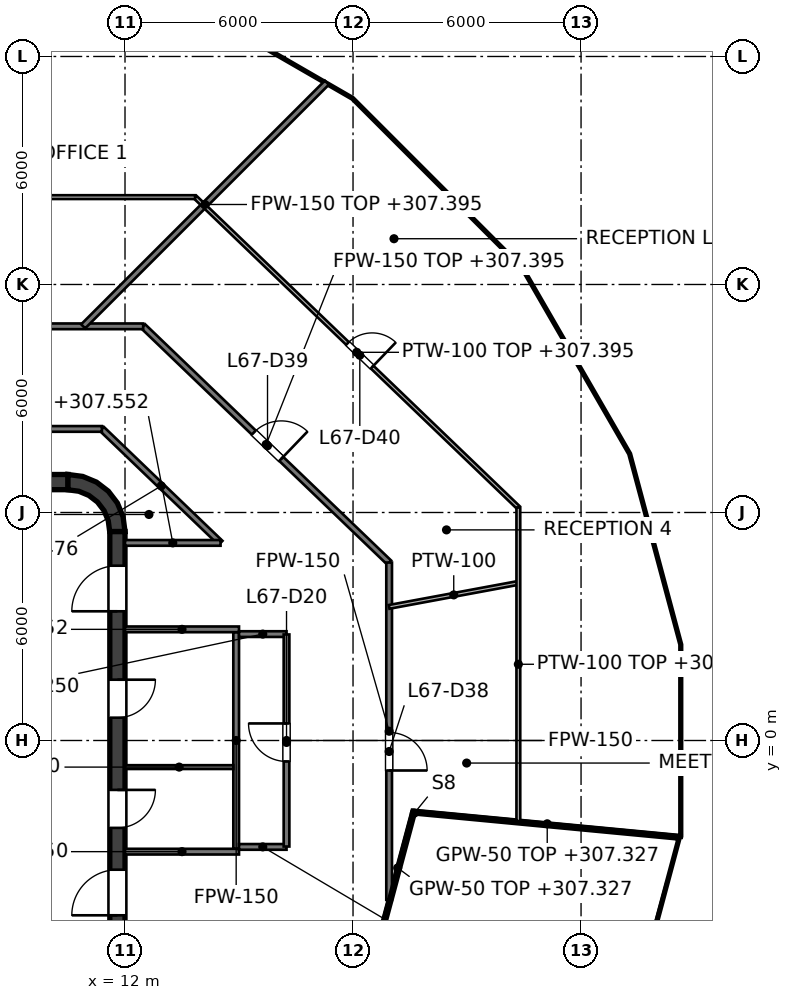
"""IFC4 building model, lengths in metres.
Left out: names, types, materials, properties, quantities, classifications, styles, units other than length and angle.
Written with IfcOpenShell. Run it as: python <this file> out.ifc"""

import sys

from ifc_helpers import new_model, si_unit, direction, frame, frame_2d, origin, place, context, subcontext, project, spatial, polyline, rectangle, outline, extrude, element, fill, save


model = new_model("IFC4")
c1 = context("Model", 3, precision=1e-05, world=origin(), true_north=direction((0.0, 1.0)))
c2 = subcontext(c1, "Body", "Model", "MODEL_VIEW")
j1 = project(units=[si_unit("LENGTHUNIT", "METRE"), si_unit("PLANEANGLEUNIT", "RADIAN")], contexts=[c1])
p1 = place(None, origin())
s1 = spatial("IfcSite", under=j1, at=p1, CompositionType="ELEMENT")
p2 = place(p1, origin())
s2 = spatial("IfcBuilding", under=s1, at=p2, CompositionType="ELEMENT")
p3 = place(p2, frame((0.0, 0.0, 304.4)))
s3 = spatial("IfcBuildingStorey", under=s2, at=p3, CompositionType="ELEMENT", Elevation=304.4)
p4 = place(p3, frame((-10.5, 6.8, 0.0), z_axis=(0.0, 0.0, 1.0), x_axis=(1.0, 0.0, 0.0)))
e1 = element("IfcWall", 1, at=p4, inside=s3, PredefinedType="SHEAR", context=c2, shape_type="SweptSolid", body=[
    extrude(rectangle(XDim=21.0, YDim=0.4, at=frame_2d((10.5, 0.0))), origin(), (0.0, 0.0, 1.0), 4.0),
])
p5 = place(p3, frame((11.8, -5.5, 0.0), z_axis=(0.0, 0.0, 1.0), x_axis=(0.0, 1.0, 0.0)))
e2 = element("IfcWall", 2, at=p5, inside=s3, PredefinedType="SHEAR", context=c2, shape_type="SweptSolid", body=[
    extrude(rectangle(XDim=11.0, YDim=0.4, at=frame_2d((5.5, 0.0))), origin(), (0.0, 0.0, 1.0), 4.0),
])
p6 = place(p5, frame((3.2, 0.0, 0.0)))
e3 = element("IfcOpeningElement", 3, at=p6, cuts=e2, PredefinedType="OPENING", context=c2, shape_type="SweptSolid", body=[
    extrude(rectangle(XDim=1.0, YDim=2.1, at=frame_2d((0.5, 1.05))), frame((0.0, 0.2, 0.0), z_axis=(0.0, -1.0, 0.0), x_axis=(1.0, 0.0, 0.0)), (0.0, 0.0, 1.0), 0.4),
])
p7 = place(p5, frame((6.1, 0.0, 0.0)))
e4 = element("IfcOpeningElement", 4, at=p7, cuts=e2, PredefinedType="OPENING", context=c2, shape_type="SweptSolid", body=[
    extrude(rectangle(XDim=1.0, YDim=2.1, at=frame_2d((0.5, 1.05))), frame((0.0, 0.2, 0.0), z_axis=(0.0, -1.0, 0.0), x_axis=(1.0, 0.0, 0.0)), (0.0, 0.0, 1.0), 0.4),
])
p8 = place(p5, frame((0.9, 0.0, 0.0)))
e5 = element("IfcOpeningElement", 5, at=p8, cuts=e2, PredefinedType="OPENING", context=c2, shape_type="SweptSolid", body=[
    extrude(rectangle(XDim=1.2, YDim=2.1, at=frame_2d((0.6, 1.05))), frame((0.0, 0.2, 0.0), z_axis=(0.0, -1.0, 0.0), x_axis=(1.0, 0.0, 0.0)), (0.0, 0.0, 1.0), 0.4),
])
p9 = place(p5, frame((8.9, 0.0, 0.0)))
e6 = element("IfcOpeningElement", 6, at=p9, cuts=e2, PredefinedType="OPENING", context=c2, shape_type="SweptSolid", body=[
    extrude(rectangle(XDim=1.2, YDim=2.1, at=frame_2d((0.6, 1.05))), frame((0.0, 0.2, 0.0), z_axis=(0.0, -1.0, 0.0), x_axis=(1.0, 0.0, 0.0)), (0.0, 0.0, 1.0), 0.4),
])
p10 = place(p3, origin())
e7 = element("IfcWall", 7, at=p10, inside=s3, PredefinedType="SHEAR", context=c2, shape_type="SweptSolid", body=[
    extrude(outline(polyline([(10.5, 7.0), (10.5, 6.596), (10.784, 6.559), (11.048, 6.45), (11.275, 6.275), (11.45, 6.048), (11.559, 5.784), (11.596, 5.5), (12.0, 5.5), (11.949, 5.888), (11.799, 6.25), (11.561, 6.561), (11.25, 6.799), (10.888, 6.949), (10.5, 7.0)])), origin(), (0.0, 0.0, 1.0), 4.0),
])
p11 = place(p3, frame((14.925, -2.85, 0.0), z_axis=(0.0, 0.0, 1.0), x_axis=(0.0, 1.0, 0.0)))
e8 = element("IfcWall", 8, at=p11, inside=s3, PredefinedType="PARTITIONING", context=c2, shape_type="SweptSolid", body=[
    extrude(rectangle(XDim=5.7, YDim=0.15, at=frame_2d((2.85, 0.0))), origin(), (0.0, 0.0, 1.0), 2.927),
])
p12 = place(p3, frame((12.0, 2.925, 0.0), z_axis=(0.0, 0.0, 1.0), x_axis=(1.0, 0.0, 0.0)))
e9 = element("IfcWall", 9, at=p12, inside=s3, PredefinedType="PARTITIONING", context=c2, shape_type="SweptSolid", body=[
    extrude(rectangle(XDim=3.0, YDim=0.15, at=frame_2d((1.5, 0.0))), origin(), (0.0, 0.0, 1.0), 3.152),
])
p13 = place(p3, frame((12.0, -2.925, 0.0), z_axis=(0.0, 0.0, 1.0), x_axis=(1.0, 0.0, 0.0)))
e10 = element("IfcWall", 10, at=p13, inside=s3, PredefinedType="PARTITIONING", context=c2, shape_type="SweptSolid", body=[
    extrude(rectangle(XDim=3.0, YDim=0.15, at=frame_2d((1.5, 0.0))), origin(), (0.0, 0.0, 1.0), 3.85),
])
p14 = place(p3, frame((12.0, -0.7, 0.0), z_axis=(0.0, 0.0, 1.0), x_axis=(1.0, 0.0, 0.0)))
e11 = element("IfcWall", 11, at=p14, inside=s3, PredefinedType="PARTITIONING", context=c2, shape_type="SweptSolid", body=[
    extrude(rectangle(XDim=2.85, YDim=0.1, at=frame_2d((1.425, 0.0))), origin(), (0.0, 0.0, 1.0), 3.85),
])
p15 = place(p3, frame((11.391, 8.199, 0.0), z_axis=(0.0, 0.0, 1.0), x_axis=(0.721256597366, -0.692667972954, 0.0)))
e12 = element("IfcWall", 12, at=p15, inside=s3, PredefinedType="PARTITIONING", context=c2, shape_type="SweptSolid", body=[
    extrude(rectangle(XDim=4.33, YDim=0.15, at=frame_2d((2.165, 0.0))), origin(), (0.0, 0.0, 1.0), 3.076),
])
p16 = place(p3, frame((12.478, 10.899, 0.0), z_axis=(0.0, 0.0, 1.0), x_axis=(0.72127259513, -0.692651314526, 0.0)))
e13 = element("IfcWall", 13, at=p16, inside=s3, PredefinedType="PARTITIONING", context=c2, shape_type="SweptSolid", body=[
    extrude(rectangle(XDim=8.974, YDim=0.15, at=frame_2d((4.487, 0.0))), origin(), (0.0, 0.0, 1.0), 2.995),
])
p17 = place(p16, frame((4.036, 0.0, 0.0)))
e14 = element("IfcOpeningElement", 14, at=p17, cuts=e13, PredefinedType="OPENING", context=c2, shape_type="SweptSolid", body=[
    extrude(rectangle(XDim=1.0, YDim=2.1, at=frame_2d((0.5, 1.05))), frame((0.0, 0.075, 0.0), z_axis=(0.0, -1.0, 0.0), x_axis=(1.0, 0.0, 0.0)), (0.0, 0.0, 1.0), 0.15),
])
for number, where, z_axis, x_axis in (
    (15, (15.0, -2.8, 0.0), (0.0, 0.0, 1.0), (1.0, 0.0, 0.0)),
    (16, (15.0, 2.8, 0.0), (0.0, 0.0, 1.0), (1.0, 0.0, 0.0)),
):
    element("IfcWall", number, at=place(p3, frame(where, z_axis=z_axis, x_axis=x_axis)), inside=s3, PredefinedType="PARTITIONING", context=c2, shape_type="SweptSolid", body=[
        extrude(rectangle(XDim=1.25, YDim=0.15, at=frame_2d((0.625, 0.0))), origin(), (0.0, 0.0, 1.0), 3.85),
    ])
p18 = place(p3, frame((12.0, 5.2, 0.0), z_axis=(0.0, 0.0, 1.0), x_axis=(1.0, 0.0, 0.0)))
e17 = element("IfcWall", 17, at=p18, inside=s3, PredefinedType="PARTITIONING", context=c2, shape_type="SweptSolid", body=[
    extrude(rectangle(XDim=2.514, YDim=0.15, at=frame_2d((1.257, 0.0))), origin(), (0.0, 0.0, 1.0), 3.152),
])
p19 = place(p3, frame((-11.391, 8.199, 0.0), z_axis=(0.0, 0.0, 1.0), x_axis=(1.0, 0.0, 0.0)))
e18 = element("IfcWall", 18, at=p19, inside=s3, PredefinedType="PARTITIONING", context=c2, shape_type="SweptSolid", body=[
    extrude(rectangle(XDim=22.782, YDim=0.15, at=frame_2d((11.391, 0.0))), origin(), (0.0, 0.0, 1.0), 2.927),
])
p20 = place(p19, frame((16.536, 0.0, 0.0)))
e19 = element("IfcOpeningElement", 19, at=p20, cuts=e18, PredefinedType="OPENING", context=c2, shape_type="SweptSolid", body=[
    extrude(rectangle(XDim=1.0, YDim=2.1, at=frame_2d((0.5, 1.05))), frame((0.0, 0.075, 0.0), z_axis=(0.0, -1.0, 0.0), x_axis=(1.0, 0.0, 0.0)), (0.0, 0.0, 1.0), 0.15),
])
p21 = place(p19, frame((5.145, 0.0, 0.0)))
e20 = element("IfcOpeningElement", 20, at=p21, cuts=e18, PredefinedType="OPENING", context=c2, shape_type="SweptSolid", body=[
    extrude(rectangle(XDim=1.0, YDim=2.1, at=frame_2d((0.5, 1.05))), frame((0.0, 0.075, 0.0), z_axis=(0.0, -1.0, 0.0), x_axis=(1.0, 0.0, 0.0)), (0.0, 0.0, 1.0), 0.15),
])
p22 = place(p3, frame((-12.478, 10.899, 0.0), z_axis=(0.0, 0.0, 1.0), x_axis=(1.0, 0.0, 0.0)))
e21 = element("IfcWall", 21, at=p22, inside=s3, PredefinedType="PARTITIONING", context=c2, shape_type="SweptSolid", body=[
    extrude(rectangle(XDim=24.956, YDim=0.15, at=frame_2d((12.478, 0.0))), origin(), (0.0, 0.0, 1.0), 2.927),
])
p23 = place(p22, frame((19.856, 0.0, 0.0)))
e22 = element("IfcOpeningElement", 22, at=p23, cuts=e21, PredefinedType="OPENING", context=c2, shape_type="SweptSolid", body=[
    extrude(rectangle(XDim=1.0, YDim=2.1, at=frame_2d((0.5, 1.05))), frame((0.0, 0.075, 0.0), z_axis=(0.0, -1.0, 0.0), x_axis=(1.0, 0.0, 0.0)), (0.0, 0.0, 1.0), 0.15),
])
p24 = place(p22, frame((14.508, 0.0, 0.0)))
e23 = element("IfcOpeningElement", 23, at=p24, cuts=e21, PredefinedType="OPENING", context=c2, shape_type="SweptSolid", body=[
    extrude(rectangle(XDim=1.0, YDim=2.1, at=frame_2d((0.5, 1.05))), frame((0.0, 0.075, 0.0), z_axis=(0.0, -1.0, 0.0), x_axis=(1.0, 0.0, 0.0)), (0.0, 0.0, 1.0), 0.15),
])
p25 = place(p22, frame((9.086, 0.0, 0.0)))
e24 = element("IfcOpeningElement", 24, at=p25, cuts=e21, PredefinedType="OPENING", context=c2, shape_type="SweptSolid", body=[
    extrude(rectangle(XDim=1.0, YDim=2.1, at=frame_2d((0.5, 1.05))), frame((0.0, 0.075, 0.0), z_axis=(0.0, -1.0, 0.0), x_axis=(1.0, 0.0, 0.0)), (0.0, 0.0, 1.0), 0.15),
])
p26 = place(p22, frame((4.344, 0.0, 0.0)))
e25 = element("IfcOpeningElement", 25, at=p26, cuts=e21, PredefinedType="OPENING", context=c2, shape_type="SweptSolid", body=[
    extrude(rectangle(XDim=1.0, YDim=2.1, at=frame_2d((0.5, 1.05))), frame((0.0, 0.075, 0.0), z_axis=(0.0, -1.0, 0.0), x_axis=(1.0, 0.0, 0.0)), (0.0, 0.0, 1.0), 0.15),
])
p27 = place(p3, frame((10.899, 10.899, 0.0), z_axis=(0.0, 0.0, 1.0), x_axis=(0.707106781187, 0.707106781187, 0.0)))
e26 = element("IfcWall", 26, at=p27, inside=s3, PredefinedType="PARTITIONING", context=c2, shape_type="SweptSolid", body=[
    extrude(rectangle(XDim=9.068, YDim=0.15, at=frame_2d((4.534, 0.0))), origin(), (0.0, 0.0, 1.0), 2.995),
])
p28 = place(p3, frame((18.95, -4.195, 0.0), z_axis=(0.0, 0.0, 1.0), x_axis=(0.0, 1.0, 0.0)))
e27 = element("IfcWall", 27, at=p28, inside=s3, PredefinedType="PARTITIONING", context=c2, shape_type="SweptSolid", body=[
    extrude(rectangle(XDim=8.878, YDim=0.15, at=frame_2d((4.439, 0.0))), origin(), (0.0, 0.0, 1.0), 2.927),
])
p29 = place(p28, frame((3.406, 0.0, 0.0)))
e28 = element("IfcOpeningElement", 28, at=p29, cuts=e27, PredefinedType="OPENING", context=c2, shape_type="SweptSolid", body=[
    extrude(rectangle(XDim=1.0, YDim=2.1, at=frame_2d((0.5, 1.05))), frame((0.0, 0.075, 0.0), z_axis=(0.0, -1.0, 0.0), x_axis=(1.0, 0.0, 0.0)), (0.0, 0.0, 1.0), 0.15),
])
p30 = place(p3, frame((16.25, -2.79, 0.0), z_axis=(0.0, 0.0, 1.0), x_axis=(0.0, 1.0, 0.0)))
e29 = element("IfcWall", 29, at=p30, inside=s3, PredefinedType="PARTITIONING", context=c2, shape_type="SweptSolid", body=[
    extrude(rectangle(XDim=5.58, YDim=0.15, at=frame_2d((2.79, 0.0))), origin(), (0.0, 0.0, 1.0), 2.927),
])
p31 = place(p30, frame((2.239, 0.0, 0.0)))
e30 = element("IfcOpeningElement", 30, at=p31, cuts=e29, PredefinedType="OPENING", context=c2, shape_type="SweptSolid", body=[
    extrude(rectangle(XDim=1.0, YDim=2.1, at=frame_2d((0.5, 1.05))), frame((0.0, 0.075, 0.0), z_axis=(0.0, -1.0, 0.0), x_axis=(1.0, 0.0, 0.0)), (0.0, 0.0, 1.0), 0.15),
])
p32 = place(p3, frame((19.576, -1.857, 0.0), z_axis=(0.0, 0.0, 1.0), x_axis=(0.995535104036, -0.09439203691, 0.0)))
e31 = element("IfcWall", 31, at=p32, inside=s3, PredefinedType="PARTITIONING", context=c2, shape_type="SweptSolid", body=[
    extrude(rectangle(XDim=7.1, YDim=0.05, at=frame_2d((3.55, 0.0))), origin(), (0.0, 0.0, 1.0), 2.927),
])
p33 = place(p3, frame((18.775, -4.849, 0.0), z_axis=(0.0, 0.0, 1.0), x_axis=(0.258525957933, 0.966004311106, 0.0)))
e32 = element("IfcWall", 32, at=p33, inside=s3, PredefinedType="PARTITIONING", context=c2, shape_type="SweptSolid", body=[
    extrude(rectangle(XDim=3.097, YDim=0.05, at=frame_2d((1.549, 0.0))), origin(), (0.0, 0.0, 1.0), 2.927),
])
p34 = place(p3, frame((13.846, 14.299, 0.0), z_axis=(0.0, 0.0, 1.0), x_axis=(0.72117874289, -0.692749031615, 0.0)))
e33 = element("IfcWall", 33, at=p34, inside=s3, PredefinedType="PARTITIONING", context=c2, shape_type="SweptSolid", body=[
    extrude(rectangle(XDim=11.791, YDim=0.1, at=frame_2d((5.896, 0.0))), origin(), (0.0, 0.0, 1.0), 2.995),
])
p35 = place(p34, frame((5.557, 0.0, 0.0)))
e34 = element("IfcOpeningElement", 34, at=p35, cuts=e33, PredefinedType="OPENING", context=c2, shape_type="SweptSolid", body=[
    extrude(rectangle(XDim=0.9, YDim=2.1, at=frame_2d((0.45, 1.05))), frame((0.0, 0.05, 0.0), z_axis=(0.0, -1.0, 0.0), x_axis=(1.0, 0.0, 0.0)), (0.0, 0.0, 1.0), 0.1),
])
p36 = place(p3, frame((-13.846, 14.299, 0.0), z_axis=(0.0, 0.0, 1.0), x_axis=(1.0, 0.0, 0.0)))
e35 = element("IfcWall", 35, at=p36, inside=s3, PredefinedType="PARTITIONING", context=c2, shape_type="SweptSolid", body=[
    extrude(rectangle(XDim=27.692, YDim=0.1, at=frame_2d((13.846, 0.0))), origin(), (0.0, 0.0, 1.0), 2.927),
])
p37 = place(p36, frame((9.035, 0.0, 0.0)))
e36 = element("IfcOpeningElement", 36, at=p37, cuts=e35, PredefinedType="OPENING", context=c2, shape_type="SweptSolid", body=[
    extrude(rectangle(XDim=1.8, YDim=2.1, at=frame_2d((0.9, 1.05))), frame((0.0, 0.05, 0.0), z_axis=(0.0, -1.0, 0.0), x_axis=(1.0, 0.0, 0.0)), (0.0, 0.0, 1.0), 0.1),
])
p38 = place(p3, frame((18.95, 3.516, 0.0), z_axis=(0.0, 0.0, 1.0), x_axis=(0.983219682599, 0.182425479991, 0.0)))
e37 = element("IfcWall", 37, at=p38, inside=s3, PredefinedType="PARTITIONING", context=c2, shape_type="SweptSolid", body=[
    extrude(rectangle(XDim=3.458, YDim=0.1, at=frame_2d((1.729, 0.0))), origin(), (0.0, 0.0, 1.0), 3.85),
])
p39 = place(p3, frame((22.35, -2.12, 0.0), z_axis=(0.0, 0.0, 1.0), x_axis=(0.0, 1.0, 0.0)))
e38 = element("IfcWall", 38, at=p39, inside=s3, PredefinedType="PARTITIONING", context=c2, shape_type="SweptSolid", body=[
    extrude(rectangle(XDim=8.252, YDim=0.1, at=frame_2d((4.126, 0.0))), origin(), (0.0, 0.0, 1.0), 2.927),
])
p40 = place(p6, origin())
e39 = element("IfcDoor", 39, at=p40, inside=s3, OperationType="SINGLE_SWING_RIGHT", PredefinedType="DOOR", context=c2, shape_type="SweptSolid", body=[
    extrude(rectangle(XDim=1.0, YDim=2.1, at=frame_2d((0.5, 1.05))), frame((0.0, 0.025, 0.0), z_axis=(0.0, -1.0, 0.0), x_axis=(1.0, 0.0, 0.0)), (0.0, 0.0, 1.0), 0.05),
])
fill(e3, e39)
p41 = place(p7, origin())
e40 = element("IfcDoor", 40, at=p41, inside=s3, OperationType="SINGLE_SWING_RIGHT", PredefinedType="DOOR", context=c2, shape_type="SweptSolid", body=[
    extrude(rectangle(XDim=1.0, YDim=2.1, at=frame_2d((0.5, 1.05))), frame((0.0, 0.025, 0.0), z_axis=(0.0, -1.0, 0.0), x_axis=(1.0, 0.0, 0.0)), (0.0, 0.0, 1.0), 0.05),
])
fill(e4, e40)
p42 = place(p8, origin())
e41 = element("IfcDoor", 41, at=p42, inside=s3, OperationType="SINGLE_SWING_LEFT", PredefinedType="DOOR", context=c2, shape_type="SweptSolid", body=[
    extrude(rectangle(XDim=1.2, YDim=2.1, at=frame_2d((0.6, 1.05))), frame((0.0, 0.025, 0.0), z_axis=(0.0, -1.0, 0.0), x_axis=(1.0, 0.0, 0.0)), (0.0, 0.0, 1.0), 0.05),
])
fill(e5, e41)
p43 = place(p9, origin())
e42 = element("IfcDoor", 42, at=p43, inside=s3, OperationType="SINGLE_SWING_LEFT", PredefinedType="DOOR", context=c2, shape_type="SweptSolid", body=[
    extrude(rectangle(XDim=1.2, YDim=2.1, at=frame_2d((0.6, 1.05))), frame((0.0, 0.025, 0.0), z_axis=(0.0, -1.0, 0.0), x_axis=(1.0, 0.0, 0.0)), (0.0, 0.0, 1.0), 0.05),
])
fill(e6, e42)
p44 = place(p31, origin())
e43 = element("IfcDoor", 43, at=p44, inside=s3, OperationType="SINGLE_SWING_RIGHT", PredefinedType="DOOR", context=c2, shape_type="SweptSolid", body=[
    extrude(rectangle(XDim=1.0, YDim=2.1, at=frame_2d((0.5, 1.05))), frame((0.0, 0.025, 0.0), z_axis=(0.0, -1.0, 0.0), x_axis=(1.0, 0.0, 0.0)), (0.0, 0.0, 1.0), 0.05),
])
fill(e30, e43)
p45 = place(p29, origin())
e44 = element("IfcDoor", 44, at=p45, inside=s3, OperationType="SINGLE_SWING_LEFT", PredefinedType="DOOR", context=c2, shape_type="SweptSolid", body=[
    extrude(rectangle(XDim=1.0, YDim=2.1, at=frame_2d((0.5, 1.05))), frame((0.0, 0.025, 0.0), z_axis=(0.0, -1.0, 0.0), x_axis=(1.0, 0.0, 0.0)), (0.0, 0.0, 1.0), 0.05),
])
fill(e28, e44)
p46 = place(p17, origin())
e45 = element("IfcDoor", 45, at=p46, inside=s3, OperationType="SINGLE_SWING_RIGHT", PredefinedType="DOOR", context=c2, shape_type="SweptSolid", body=[
    extrude(rectangle(XDim=1.0, YDim=2.1, at=frame_2d((0.5, 1.05))), frame((0.0, 0.025, 0.0), z_axis=(0.0, -1.0, 0.0), x_axis=(1.0, 0.0, 0.0)), (0.0, 0.0, 1.0), 0.05),
])
fill(e14, e45)
p47 = place(p35, origin())
e46 = element("IfcDoor", 46, at=p47, inside=s3, OperationType="SINGLE_SWING_RIGHT", PredefinedType="DOOR", context=c2, shape_type="SweptSolid", body=[
    extrude(rectangle(XDim=0.9, YDim=2.1, at=frame_2d((0.45, 1.05))), frame((0.0, 0.025, 0.0), z_axis=(0.0, -1.0, 0.0), x_axis=(1.0, 0.0, 0.0)), (0.0, 0.0, 1.0), 0.05),
])
fill(e34, e46)
save(model, sys.argv[1])
